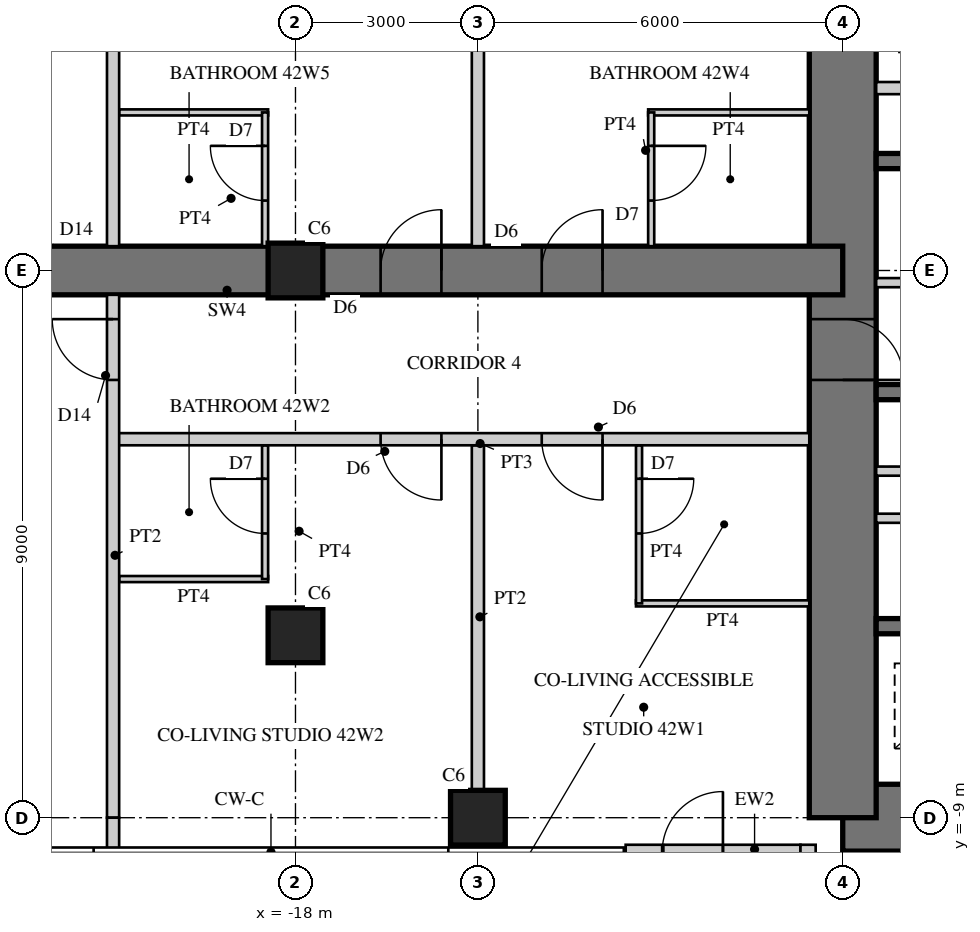
"""IFC4 building model, lengths in metres.
Left out: names, types, materials, properties, quantities, classifications, styles, units other than length and angle.
Written with IfcOpenShell. Run it as: python <this file> out.ifc"""

import sys

from ifc_helpers import new_model, si_unit, direction, frame, frame_2d, origin, origin_2d, place, context, subcontext, project, spatial, rectangle, hollow_rectangle, extrude, element, fill, save


model = new_model("IFC4")
c1 = context("Model", 3, precision=1e-05, world=origin(), true_north=direction((0.0, 1.0)))
c2 = subcontext(c1, "Body", "Model", "MODEL_VIEW")
j1 = project(units=[si_unit("LENGTHUNIT", "METRE"), si_unit("PLANEANGLEUNIT", "RADIAN")], contexts=[c1])
p1 = place(None, origin())
s1 = spatial("IfcSite", under=j1, at=p1, CompositionType="ELEMENT")
p2 = place(p1, origin())
s2 = spatial("IfcBuilding", under=s1, at=p2, CompositionType="ELEMENT")
p3 = place(p2, frame((0.0, 0.0, 172.9)))
s3 = spatial("IfcBuildingStorey", under=s2, at=p3, CompositionType="ELEMENT", Elevation=172.9)
p4 = place(p3, frame((-9.0, -9.0, 0.0), z_axis=(0.0, 0.0, 1.0), x_axis=(1.0, 0.0, 0.0)))
e1 = element("IfcWall", 1, at=p4, inside=s3, PredefinedType="SHEAR", context=c2, shape_type="SweptSolid", body=[
    extrude(rectangle(XDim=18.0, YDim=1.1, at=frame_2d((9.0, 0.0))), origin(), (0.0, 0.0, 1.0), 3.4),
])
p5 = place(p4, frame((9.8, 0.0, 0.0)))
e2 = element("IfcOpeningElement", 2, at=p5, cuts=e1, PredefinedType="OPENING", context=c2, shape_type="SweptSolid", body=[
    extrude(rectangle(XDim=1.0, YDim=2.4, at=frame_2d((0.5, 1.2))), frame((0.0, 0.56, 0.0), z_axis=(0.0, -1.0, 0.0), x_axis=(1.0, 0.0, 0.0)), (0.0, 0.0, 1.0), 1.12),
])
p6 = place(p3, frame((-9.0, 9.0, 0.0), z_axis=(0.0, 0.0, 1.0), x_axis=(0.0, -1.0, 0.0)))
e3 = element("IfcWall", 3, at=p6, inside=s3, PredefinedType="SHEAR", context=c2, shape_type="SweptSolid", body=[
    extrude(rectangle(XDim=18.0, YDim=1.1, at=frame_2d((9.0, 0.0))), origin(), (0.0, 0.0, 1.0), 3.4),
])
p7 = place(p6, frame((9.8, 0.0, 0.0)))
e4 = element("IfcOpeningElement", 4, at=p7, cuts=e3, PredefinedType="OPENING", context=c2, shape_type="SweptSolid", body=[
    extrude(rectangle(XDim=1.0, YDim=2.4, at=frame_2d((0.5, 1.2))), frame((0.0, 0.56, 0.0), z_axis=(0.0, -1.0, 0.0), x_axis=(1.0, 0.0, 0.0)), (0.0, 0.0, 1.0), 1.12),
])
p8 = place(p3, frame((-2.125, 1.8, 0.0), z_axis=(0.0, 0.0, 1.0), x_axis=(-1.0, 0.0, 0.0)))
e5 = element("IfcWall", 5, at=p8, inside=s3, PredefinedType="SHEAR", context=c2, shape_type="SweptSolid", body=[
    extrude(rectangle(XDim=6.325, YDim=0.25, at=frame_2d((3.163, 0.0))), origin(), (0.0, 0.0, 1.0), 3.4),
])
p9 = place(p3, frame((-5.725, 3.0, 0.0), z_axis=(0.0, 0.0, 1.0), x_axis=(-1.0, 0.0, 0.0)))
e6 = element("IfcWall", 6, at=p9, inside=s3, PredefinedType="PARTITIONING", context=c2, shape_type="SweptSolid", body=[
    extrude(rectangle(XDim=2.725, YDim=0.2, at=frame_2d((1.362, 0.0))), origin(), (0.0, 0.0, 1.0), 3.4),
])
p10 = place(p3, frame((-1.925, -2.0, 0.0), z_axis=(0.0, 0.0, 1.0), x_axis=(-1.0, 0.0, 0.0)))
e7 = element("IfcWall", 7, at=p10, inside=s3, PredefinedType="SHEAR", context=c2, shape_type="SweptSolid", body=[
    extrude(rectangle(XDim=6.525, YDim=0.25, at=frame_2d((3.262, 0.0))), origin(), (0.0, 0.0, 1.0), 3.4),
])
p11 = place(p3, frame((-1.925, -5.85, 0.0), z_axis=(0.0, 0.0, 1.0), x_axis=(-1.0, 0.0, 0.0)))
e8 = element("IfcWall", 8, at=p11, inside=s3, PredefinedType="SHEAR", context=c2, shape_type="SweptSolid", body=[
    extrude(rectangle(XDim=6.525, YDim=0.25, at=frame_2d((3.262, 0.0))), origin(), (0.0, 0.0, 1.0), 3.4),
])
p12 = place(p11, frame((0.471, 0.0, 0.0)))
e9 = element("IfcOpeningElement", 9, at=p12, cuts=e8, PredefinedType="OPENING", context=c2, shape_type="SweptSolid", body=[
    extrude(rectangle(XDim=1.1, YDim=2.2, at=frame_2d((0.55, 1.1))), frame((0.0, 0.135, 0.0), z_axis=(0.0, -1.0, 0.0), x_axis=(1.0, 0.0, 0.0)), (0.0, 0.0, 1.0), 0.27),
])
p13 = place(p11, frame((2.712, 0.0, 0.0)))
e10 = element("IfcOpeningElement", 10, at=p13, cuts=e8, PredefinedType="OPENING", context=c2, shape_type="SweptSolid", body=[
    extrude(rectangle(XDim=1.1, YDim=2.2, at=frame_2d((0.55, 1.1))), frame((0.0, 0.135, 0.0), z_axis=(0.0, -1.0, 0.0), x_axis=(1.0, 0.0, 0.0)), (0.0, 0.0, 1.0), 0.27),
])
p14 = place(p11, frame((4.954, 0.0, 0.0)))
e11 = element("IfcOpeningElement", 11, at=p14, cuts=e8, PredefinedType="OPENING", context=c2, shape_type="SweptSolid", body=[
    extrude(rectangle(XDim=1.1, YDim=2.2, at=frame_2d((0.55, 1.1))), frame((0.0, 0.135, 0.0), z_axis=(0.0, -1.0, 0.0), x_axis=(1.0, 0.0, 0.0)), (0.0, 0.0, 1.0), 0.27),
])
p15 = place(p3, frame((-1.925, -3.3, 0.0), z_axis=(0.0, 0.0, 1.0), x_axis=(-1.0, 0.0, 0.0)))
e12 = element("IfcWall", 12, at=p15, inside=s3, PredefinedType="PARTITIONING", context=c2, shape_type="SweptSolid", body=[
    extrude(rectangle(XDim=6.525, YDim=0.15, at=frame_2d((3.262, 0.0))), origin(), (0.0, 0.0, 1.0), 3.4),
])
p16 = place(p15, frame((0.075, 0.0, 0.0)))
e13 = element("IfcOpeningElement", 13, at=p16, cuts=e12, PredefinedType="OPENING", context=c2, shape_type="SweptSolid", body=[
    extrude(rectangle(XDim=0.8, YDim=2.1, at=frame_2d((0.4, 1.05))), frame((0.0, 0.085, 0.0), z_axis=(0.0, -1.0, 0.0), x_axis=(1.0, 0.0, 0.0)), (0.0, 0.0, 1.0), 0.17),
])
p17 = place(p15, frame((3.675, 0.0, 0.0)))
e14 = element("IfcOpeningElement", 14, at=p17, cuts=e12, PredefinedType="OPENING", context=c2, shape_type="SweptSolid", body=[
    extrude(rectangle(XDim=0.8, YDim=2.1, at=frame_2d((0.4, 1.05))), frame((0.0, 0.085, 0.0), z_axis=(0.0, -1.0, 0.0), x_axis=(1.0, 0.0, 0.0)), (0.0, 0.0, 1.0), 0.17),
])
p18 = place(p3, frame((-9.0, 0.0, 0.0), z_axis=(0.0, 0.0, 1.0), x_axis=(-1.0, 0.0, 0.0)))
e15 = element("IfcWall", 15, at=p18, inside=s3, PredefinedType="SHEAR", context=c2, shape_type="SweptSolid", body=[
    extrude(rectangle(XDim=18.0, YDim=0.8, at=frame_2d((9.0, 0.0))), origin(), (0.0, 0.0, 1.0), 3.4),
])
p19 = place(p18, frame((3.95, 0.0, 0.0)))
e16 = element("IfcOpeningElement", 16, at=p19, cuts=e15, PredefinedType="OPENING", context=c2, shape_type="SweptSolid", body=[
    extrude(rectangle(XDim=1.0, YDim=2.15, at=frame_2d((0.5, 1.075))), frame((0.0, 0.41, 0.0), z_axis=(0.0, -1.0, 0.0), x_axis=(1.0, 0.0, 0.0)), (0.0, 0.0, 1.0), 0.82),
])
p20 = place(p18, frame((6.6, 0.0, 0.0)))
e17 = element("IfcOpeningElement", 17, at=p20, cuts=e15, PredefinedType="OPENING", context=c2, shape_type="SweptSolid", body=[
    extrude(rectangle(XDim=1.0, YDim=2.15, at=frame_2d((0.5, 1.075))), frame((0.0, 0.41, 0.0), z_axis=(0.0, -1.0, 0.0), x_axis=(1.0, 0.0, 0.0)), (0.0, 0.0, 1.0), 0.82),
])
p21 = place(p18, frame((13.25, 0.0, 0.0)))
e18 = element("IfcOpeningElement", 18, at=p21, cuts=e15, PredefinedType="OPENING", context=c2, shape_type="SweptSolid", body=[
    extrude(rectangle(XDim=1.0, YDim=2.2, at=frame_2d((0.5, 1.1))), frame((0.0, 0.41, 0.0), z_axis=(0.0, -1.0, 0.0), x_axis=(1.0, 0.0, 0.0)), (0.0, 0.0, 1.0), 0.82),
])
for number, where, z_axis, x_axis in (
    (19, (-15.0, -9.0, 0.0), (0.0, 0.0, 1.0), (1.0, 0.0, 0.0)),
    (20, (-18.0, 0.0, 0.0), (0.0, 0.0, 1.0), (1.0, 0.0, 0.0)),
    (21, (-18.0, -6.0, 0.0), (0.0, 0.0, 1.0), (1.0, 0.0, 0.0)),
):
    element("IfcColumn", number, at=place(p3, frame(where, z_axis=z_axis, x_axis=x_axis)), inside=s3, PredefinedType="COLUMN", context=c2, shape_type="SweptSolid", body=[
        extrude(rectangle(XDim=0.9, YDim=0.9, at=origin_2d()), origin(), (0.0, 0.0, 1.0), 3.4),
    ])
p22 = place(p3, frame((-12.57, -9.57, 0.0), z_axis=(0.0, 0.0, 1.0), x_axis=(1.0, 0.0, 0.0)))
e22 = element("IfcWall", 22, at=p22, inside=s3, PredefinedType="SOLIDWALL", context=c2, shape_type="SweptSolid", body=[
    extrude(rectangle(XDim=2.875, YDim=0.25, at=frame_2d((1.438, 0.0))), origin(), (0.0, 0.0, 1.0), 3.22),
])
p23 = place(p22, frame((0.6, 0.0, 0.0)))
e23 = element("IfcOpeningElement", 23, at=p23, cuts=e22, PredefinedType="OPENING", context=c2, shape_type="SweptSolid", body=[
    extrude(rectangle(XDim=1.0, YDim=2.2, at=frame_2d((0.5, 1.1))), frame((0.0, 0.135, 0.0), z_axis=(0.0, -1.0, 0.0), x_axis=(1.0, 0.0, 0.0)), (0.0, 0.0, 1.0), 0.27),
])
p24 = place(p3, frame((-9.57, -9.445, 0.0), z_axis=(0.0, 0.0, 1.0), x_axis=(0.0, -1.0, 0.0)))
e24 = element("IfcWall", 24, at=p24, inside=s3, PredefinedType="SOLIDWALL", context=c2, shape_type="SweptSolid", body=[
    extrude(rectangle(XDim=3.125, YDim=0.25, at=frame_2d((1.562, 0.0))), origin(), (0.0, 0.0, 1.0), 3.22),
])
p25 = place(p24, frame((0.6, 0.0, 0.0)))
e25 = element("IfcOpeningElement", 25, at=p25, cuts=e24, PredefinedType="OPENING", context=c2, shape_type="SweptSolid", body=[
    extrude(rectangle(XDim=1.0, YDim=2.2, at=frame_2d((0.5, 1.1))), frame((0.0, 0.135, 0.0), z_axis=(0.0, -1.0, 0.0), x_axis=(1.0, 0.0, 0.0)), (0.0, 0.0, 1.0), 0.27),
])
p26 = place(p3, frame((-2.325, -0.2, 0.0), z_axis=(0.0, 0.0, 1.0), x_axis=(-1.0, 0.0, 0.0)))
e26 = element("IfcWall", 26, at=p26, inside=s3, PredefinedType="PARTITIONING", context=c2, shape_type="SweptSolid", body=[
    extrude(rectangle(XDim=6.125, YDim=0.15, at=frame_2d((3.062, 0.0))), origin(), (0.0, 0.0, 1.0), 3.22),
])
p27 = place(p26, frame((0.4, 0.0, 0.0)))
e27 = element("IfcOpeningElement", 27, at=p27, cuts=e26, PredefinedType="OPENING", context=c2, shape_type="SweptSolid", body=[
    extrude(rectangle(XDim=1.0, YDim=2.1, at=frame_2d((0.5, 1.05))), frame((0.0, 0.085, 0.0), z_axis=(0.0, -1.0, 0.0), x_axis=(1.0, 0.0, 0.0)), (0.0, 0.0, 1.0), 0.17),
])
p28 = place(p3, frame((-3.325, -4.075, 0.0), z_axis=(0.0, 0.0, 1.0), x_axis=(-1.0, 0.0, 0.0)))
e28 = element("IfcWall", 28, at=p28, inside=s3, PredefinedType="PARTITIONING", context=c2, shape_type="SweptSolid", body=[
    extrude(rectangle(XDim=5.125, YDim=0.15, at=frame_2d((2.562, 0.0))), origin(), (0.0, 0.0, 1.0), 3.22),
])
p29 = place(p28, frame((2.062, 0.0, 0.0)))
e29 = element("IfcOpeningElement", 29, at=p29, cuts=e28, PredefinedType="OPENING", context=c2, shape_type="SweptSolid", body=[
    extrude(rectangle(XDim=1.0, YDim=2.1, at=frame_2d((0.5, 1.05))), frame((0.0, 0.085, 0.0), z_axis=(0.0, -1.0, 0.0), x_axis=(1.0, 0.0, 0.0)), (0.0, 0.0, 1.0), 0.17),
])
p30 = place(p3, frame((-9.55, -5.475, 0.0), z_axis=(0.0, 0.0, 1.0), x_axis=(-1.0, 0.0, 0.0)))
e30 = element("IfcWall", 30, at=p30, inside=s3, PredefinedType="PARTITIONING", context=c2, shape_type="SweptSolid", body=[
    extrude(rectangle(XDim=2.85, YDim=0.1, at=frame_2d((1.425, 0.0))), origin(), (0.0, 0.0, 1.0), 3.22),
])
p31 = place(p3, frame((-12.35, -2.875, 0.0), z_axis=(0.0, 0.0, 1.0), x_axis=(0.0, -1.0, 0.0)))
e31 = element("IfcWall", 31, at=p31, inside=s3, PredefinedType="PARTITIONING", context=c2, shape_type="SweptSolid", body=[
    extrude(rectangle(XDim=2.6, YDim=0.1, at=frame_2d((1.3, 0.0))), origin(), (0.0, 0.0, 1.0), 3.22),
])
p32 = place(p31, frame((0.55, 0.0, 0.0)))
e32 = element("IfcOpeningElement", 32, at=p32, cuts=e31, PredefinedType="OPENING", context=c2, shape_type="SweptSolid", body=[
    extrude(rectangle(XDim=0.9, YDim=2.1, at=frame_2d((0.45, 1.05))), frame((0.0, 0.06, 0.0), z_axis=(0.0, -1.0, 0.0), x_axis=(1.0, 0.0, 0.0)), (0.0, 0.0, 1.0), 0.12),
])
p33 = place(p3, frame((-9.55, 2.6, 0.0), z_axis=(0.0, 0.0, 1.0), x_axis=(-1.0, 0.0, 0.0)))
e33 = element("IfcWall", 33, at=p33, inside=s3, PredefinedType="PARTITIONING", context=c2, shape_type="SweptSolid", body=[
    extrude(rectangle(XDim=2.65, YDim=0.1, at=frame_2d((1.325, 0.0))), origin(), (0.0, 0.0, 1.0), 3.22),
])
p34 = place(p3, frame((-12.15, 2.6, 0.0), z_axis=(0.0, 0.0, 1.0), x_axis=(0.0, -1.0, 0.0)))
e34 = element("IfcWall", 34, at=p34, inside=s3, PredefinedType="PARTITIONING", context=c2, shape_type="SweptSolid", body=[
    extrude(rectangle(XDim=2.2, YDim=0.1, at=frame_2d((1.1, 0.0))), origin(), (0.0, 0.0, 1.0), 3.22),
])
p35 = place(p34, frame((0.55, 0.0, 0.0)))
e35 = element("IfcOpeningElement", 35, at=p35, cuts=e34, PredefinedType="OPENING", context=c2, shape_type="SweptSolid", body=[
    extrude(rectangle(XDim=0.9, YDim=2.1, at=frame_2d((0.45, 1.05))), frame((0.0, 0.06, 0.0), z_axis=(0.0, -1.0, 0.0), x_axis=(1.0, 0.0, 0.0)), (0.0, 0.0, 1.0), 0.12),
])
p36 = place(p3, frame((-15.0, -2.875, 0.0), z_axis=(0.0, 0.0, 1.0), x_axis=(0.0, -1.0, 0.0)))
e36 = element("IfcWall", 36, at=p36, inside=s3, PredefinedType="SOLIDWALL", context=c2, shape_type="SweptSolid", body=[
    extrude(rectangle(XDim=5.675, YDim=0.2, at=frame_2d((2.837, 0.0))), origin(), (0.0, 0.0, 1.0), 2.47),
])
p37 = place(p3, frame((-15.0, 8.55, 0.0), z_axis=(0.0, 0.0, 1.0), x_axis=(0.0, -1.0, 0.0)))
e37 = element("IfcWall", 37, at=p37, inside=s3, PredefinedType="SOLIDWALL", context=c2, shape_type="SweptSolid", body=[
    extrude(rectangle(XDim=8.15, YDim=0.2, at=frame_2d((4.075, 0.0))), origin(), (0.0, 0.0, 1.0), 2.47),
])
p38 = place(p3, frame((-18.45, -5.075, 0.0), z_axis=(0.0, 0.0, 1.0), x_axis=(-1.0, 0.0, 0.0)))
e38 = element("IfcWall", 38, at=p38, inside=s3, PredefinedType="PARTITIONING", context=c2, shape_type="SweptSolid", body=[
    extrude(rectangle(XDim=2.45, YDim=0.1, at=frame_2d((1.225, 0.0))), origin(), (0.0, 0.0, 1.0), 3.22),
])
p39 = place(p3, frame((-18.5, -2.875, 0.0), z_axis=(0.0, 0.0, 1.0), x_axis=(0.0, -1.0, 0.0)))
e39 = element("IfcWall", 39, at=p39, inside=s3, PredefinedType="PARTITIONING", context=c2, shape_type="SweptSolid", body=[
    extrude(rectangle(XDim=2.2, YDim=0.1, at=frame_2d((1.1, 0.0))), origin(), (0.0, 0.0, 1.0), 3.22),
])
p40 = place(p39, frame((0.55, 0.0, 0.0)))
e40 = element("IfcOpeningElement", 40, at=p40, cuts=e39, PredefinedType="OPENING", context=c2, shape_type="SweptSolid", body=[
    extrude(rectangle(XDim=0.9, YDim=2.1, at=frame_2d((0.45, 1.05))), frame((0.0, 0.06, 0.0), z_axis=(0.0, -1.0, 0.0), x_axis=(1.0, 0.0, 0.0)), (0.0, 0.0, 1.0), 0.12),
])
p41 = place(p3, frame((-18.45, 2.6, 0.0), z_axis=(0.0, 0.0, 1.0), x_axis=(-1.0, 0.0, 0.0)))
e41 = element("IfcWall", 41, at=p41, inside=s3, PredefinedType="PARTITIONING", context=c2, shape_type="SweptSolid", body=[
    extrude(rectangle(XDim=2.45, YDim=0.1, at=frame_2d((1.225, 0.0))), origin(), (0.0, 0.0, 1.0), 3.22),
])
p42 = place(p3, frame((-18.5, 2.6, 0.0), z_axis=(0.0, 0.0, 1.0), x_axis=(0.0, -1.0, 0.0)))
e42 = element("IfcWall", 42, at=p42, inside=s3, PredefinedType="PARTITIONING", context=c2, shape_type="SweptSolid", body=[
    extrude(rectangle(XDim=2.2, YDim=0.1, at=frame_2d((1.1, 0.0))), origin(), (0.0, 0.0, 1.0), 3.22),
])
p43 = place(p42, frame((0.55, 0.0, 0.0)))
e43 = element("IfcOpeningElement", 43, at=p43, cuts=e42, PredefinedType="OPENING", context=c2, shape_type="SweptSolid", body=[
    extrude(rectangle(XDim=0.9, YDim=2.1, at=frame_2d((0.45, 1.05))), frame((0.0, 0.06, 0.0), z_axis=(0.0, -1.0, 0.0), x_axis=(1.0, 0.0, 0.0)), (0.0, 0.0, 1.0), 0.12),
])
p44 = place(p3, frame((-9.55, -2.775, 0.0), z_axis=(0.0, 0.0, 1.0), x_axis=(-1.0, 0.0, 0.0)))
e44 = element("IfcWall", 44, at=p44, inside=s3, PredefinedType="SOLIDWALL", context=c2, shape_type="SweptSolid", body=[
    extrude(rectangle(XDim=11.45, YDim=0.2, at=frame_2d((5.725, 0.0))), origin(), (0.0, 0.0, 1.0), 3.22),
])
p45 = place(p44, frame((3.4, 0.0, 0.0)))
e45 = element("IfcOpeningElement", 45, at=p45, cuts=e44, PredefinedType="OPENING", context=c2, shape_type="SweptSolid", body=[
    extrude(rectangle(XDim=1.0, YDim=2.15, at=frame_2d((0.5, 1.075))), frame((0.0, 0.11, 0.0), z_axis=(0.0, -1.0, 0.0), x_axis=(1.0, 0.0, 0.0)), (0.0, 0.0, 1.0), 0.22),
])
p46 = place(p44, frame((6.05, 0.0, 0.0)))
e46 = element("IfcOpeningElement", 46, at=p46, cuts=e44, PredefinedType="OPENING", context=c2, shape_type="SweptSolid", body=[
    extrude(rectangle(XDim=1.0, YDim=2.15, at=frame_2d((0.5, 1.075))), frame((0.0, 0.11, 0.0), z_axis=(0.0, -1.0, 0.0), x_axis=(1.0, 0.0, 0.0)), (0.0, 0.0, 1.0), 0.22),
])
p47 = place(p3, frame((-21.0, 9.0, 0.0), z_axis=(0.0, 0.0, 1.0), x_axis=(0.0, -1.0, 0.0)))
e47 = element("IfcWall", 47, at=p47, inside=s3, PredefinedType="SOLIDWALL", context=c2, shape_type="SweptSolid", body=[
    extrude(rectangle(XDim=8.6, YDim=0.2, at=frame_2d((4.3, 0.0))), origin(), (0.0, 0.0, 1.0), 2.62),
])
p48 = place(p3, frame((-21.0, -0.4, 0.0), z_axis=(0.0, 0.0, 1.0), x_axis=(0.0, -1.0, 0.0)))
e48 = element("IfcWall", 48, at=p48, inside=s3, PredefinedType="SOLIDWALL", context=c2, shape_type="SweptSolid", body=[
    extrude(rectangle(XDim=8.6, YDim=0.2, at=frame_2d((4.3, 0.0))), origin(), (0.0, 0.0, 1.0), 2.62),
])
p49 = place(p48, frame((0.4, 0.0, 0.0)))
e49 = element("IfcOpeningElement", 49, at=p49, cuts=e48, PredefinedType="OPENING", context=c2, shape_type="SweptSolid", body=[
    extrude(rectangle(XDim=1.0, YDim=2.2, at=frame_2d((0.5, 1.1))), frame((0.0, 0.11, 0.0), z_axis=(0.0, -1.0, 0.0), x_axis=(1.0, 0.0, 0.0)), (0.0, 0.0, 1.0), 0.22),
])
p50 = place(p3, frame((-21.0, -9.0, 0.0), z_axis=(0.0, 0.0, 1.0), x_axis=(0.0, -1.0, 0.0)))
e50 = element("IfcWall", 50, at=p50, inside=s3, PredefinedType="SOLIDWALL", context=c2, shape_type="SweptSolid", body=[
    extrude(rectangle(XDim=0.53, YDim=0.2, at=frame_2d((0.265, 0.0))), origin(), (0.0, 0.0, 1.0), 3.22),
])
p51 = place(p23, origin())
e51 = element("IfcDoor", 51, at=p51, inside=s3, OperationType="SINGLE_SWING_RIGHT", PredefinedType="DOOR", context=c2, shape_type="SweptSolid", body=[
    extrude(hollow_rectangle(XDim=1.0, YDim=2.2, WallThickness=0.06, at=frame_2d((0.5, 1.1))), frame((0.0, 0.025, 0.0), z_axis=(0.0, -1.0, 0.0), x_axis=(1.0, 0.0, 0.0)), (0.0, 0.0, 1.0), 0.05),
    extrude(rectangle(XDim=0.879, YDim=2.079, at=frame_2d((0.5, 1.1))), frame((0.0, 0.025, 0.0), z_axis=(0.0, -1.0, 0.0), x_axis=(1.0, 0.0, 0.0)), (0.0, 0.0, 1.0), 0.05),
])
fill(e23, e51)
p52 = place(p32, origin())
e52 = element("IfcDoor", 52, at=p52, inside=s3, OperationType="SINGLE_SWING_LEFT", PredefinedType="DOOR", context=c2, shape_type="SweptSolid", body=[
    extrude(rectangle(XDim=0.9, YDim=2.1, at=frame_2d((0.45, 1.05))), frame((0.0, 0.025, 0.0), z_axis=(0.0, -1.0, 0.0), x_axis=(1.0, 0.0, 0.0)), (0.0, 0.0, 1.0), 0.05),
])
fill(e32, e52)
p53 = place(p35, origin())
e53 = element("IfcDoor", 53, at=p53, inside=s3, OperationType="SINGLE_SWING_LEFT", PredefinedType="DOOR", context=c2, shape_type="SweptSolid", body=[
    extrude(rectangle(XDim=0.9, YDim=2.1, at=frame_2d((0.45, 1.05))), frame((0.0, 0.025, 0.0), z_axis=(0.0, -1.0, 0.0), x_axis=(1.0, 0.0, 0.0)), (0.0, 0.0, 1.0), 0.05),
])
fill(e35, e53)
p54 = place(p40, frame((0.9, 0.0, 0.0), z_axis=(0.0, 0.0, 1.0), x_axis=(-1.0, 0.0, 0.0)))
e54 = element("IfcDoor", 54, at=p54, inside=s3, OperationType="SINGLE_SWING_RIGHT", PredefinedType="DOOR", context=c2, shape_type="SweptSolid", body=[
    extrude(rectangle(XDim=0.9, YDim=2.1, at=frame_2d((0.45, 1.05))), frame((0.0, 0.025, 0.0), z_axis=(0.0, -1.0, 0.0), x_axis=(1.0, 0.0, 0.0)), (0.0, 0.0, 1.0), 0.05),
])
fill(e40, e54)
p55 = place(p43, frame((0.9, 0.0, 0.0), z_axis=(0.0, 0.0, 1.0), x_axis=(-1.0, 0.0, 0.0)))
e55 = element("IfcDoor", 55, at=p55, inside=s3, OperationType="SINGLE_SWING_RIGHT", PredefinedType="DOOR", context=c2, shape_type="SweptSolid", body=[
    extrude(rectangle(XDim=0.9, YDim=2.1, at=frame_2d((0.45, 1.05))), frame((0.0, 0.025, 0.0), z_axis=(0.0, -1.0, 0.0), x_axis=(1.0, 0.0, 0.0)), (0.0, 0.0, 1.0), 0.05),
])
fill(e43, e55)
p56 = place(p45, origin())
e56 = element("IfcDoor", 56, at=p56, inside=s3, OperationType="SINGLE_SWING_LEFT", PredefinedType="DOOR", context=c2, shape_type="SweptSolid", body=[
    extrude(rectangle(XDim=1.0, YDim=2.15, at=frame_2d((0.5, 1.075))), frame((0.0, 0.025, 0.0), z_axis=(0.0, -1.0, 0.0), x_axis=(1.0, 0.0, 0.0)), (0.0, 0.0, 1.0), 0.05),
])
fill(e45, e56)
p57 = place(p46, origin())
e57 = element("IfcDoor", 57, at=p57, inside=s3, OperationType="SINGLE_SWING_LEFT", PredefinedType="DOOR", context=c2, shape_type="SweptSolid", body=[
    extrude(rectangle(XDim=1.0, YDim=2.15, at=frame_2d((0.5, 1.075))), frame((0.0, 0.025, 0.0), z_axis=(0.0, -1.0, 0.0), x_axis=(1.0, 0.0, 0.0)), (0.0, 0.0, 1.0), 0.05),
])
fill(e46, e57)
p58 = place(p49, frame((1.0, 0.0, 0.0), z_axis=(0.0, 0.0, 1.0), x_axis=(-1.0, 0.0, 0.0)))
e58 = element("IfcDoor", 58, at=p58, inside=s3, OperationType="SINGLE_SWING_RIGHT", PredefinedType="DOOR", context=c2, shape_type="SweptSolid", body=[
    extrude(rectangle(XDim=1.0, YDim=2.2, at=frame_2d((0.5, 1.1))), frame((0.0, 0.025, 0.0), z_axis=(0.0, -1.0, 0.0), x_axis=(1.0, 0.0, 0.0)), (0.0, 0.0, 1.0), 0.05),
])
fill(e49, e58)
p59 = place(p19, frame((1.0, 0.0, 0.0), z_axis=(0.0, 0.0, 1.0), x_axis=(-1.0, 0.0, 0.0)))
e59 = element("IfcDoor", 59, at=p59, inside=s3, OperationType="SINGLE_SWING_RIGHT", PredefinedType="DOOR", context=c2, shape_type="SweptSolid", body=[
    extrude(rectangle(XDim=1.0, YDim=2.15, at=frame_2d((0.5, 1.075))), frame((0.0, 0.025, 0.0), z_axis=(0.0, -1.0, 0.0), x_axis=(1.0, 0.0, 0.0)), (0.0, 0.0, 1.0), 0.05),
])
fill(e16, e59)
p60 = place(p20, frame((1.0, 0.0, 0.0), z_axis=(0.0, 0.0, 1.0), x_axis=(-1.0, 0.0, 0.0)))
e60 = element("IfcDoor", 60, at=p60, inside=s3, OperationType="SINGLE_SWING_RIGHT", PredefinedType="DOOR", context=c2, shape_type="SweptSolid", body=[
    extrude(rectangle(XDim=1.0, YDim=2.15, at=frame_2d((0.5, 1.075))), frame((0.0, 0.025, 0.0), z_axis=(0.0, -1.0, 0.0), x_axis=(1.0, 0.0, 0.0)), (0.0, 0.0, 1.0), 0.05),
])
fill(e17, e60)
p61 = place(p7, origin())
e61 = element("IfcDoor", 61, at=p61, inside=s3, OperationType="SINGLE_SWING_RIGHT", PredefinedType="DOOR", context=c2, shape_type="SweptSolid", body=[
    extrude(rectangle(XDim=1.0, YDim=2.4, at=frame_2d((0.5, 1.2))), frame((0.0, 0.055, 0.0), z_axis=(0.0, -1.0, 0.0), x_axis=(1.0, 0.0, 0.0)), (0.0, 0.0, 1.0), 0.05),
])
fill(e4, e61)
save(model, sys.argv[1])
